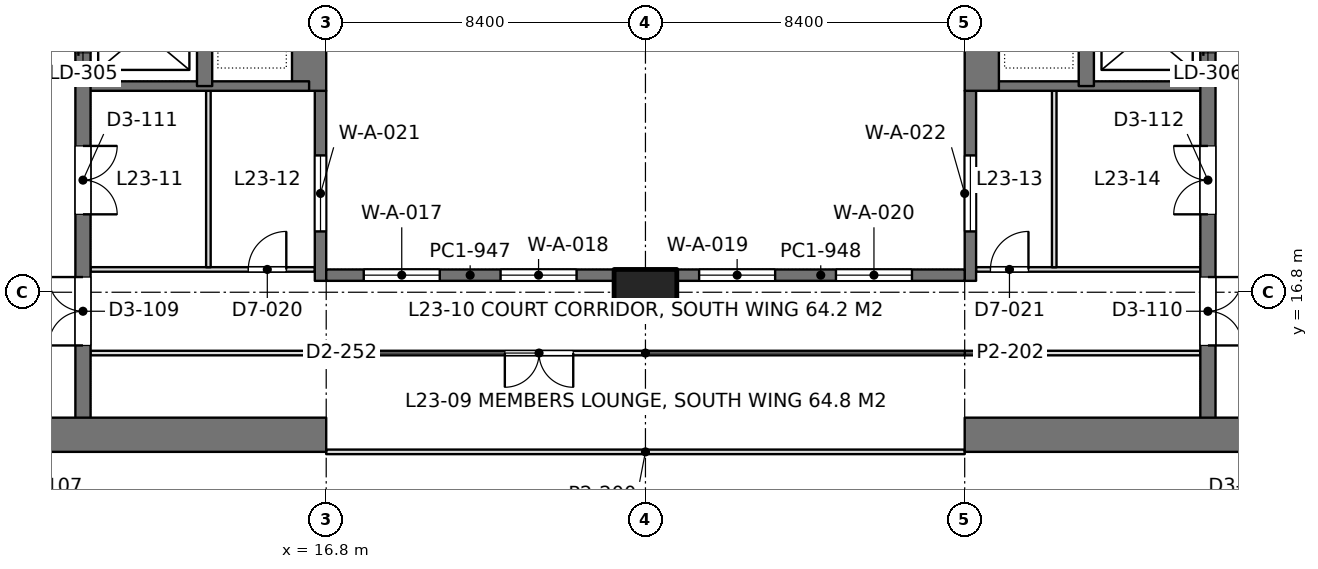
"""IFC4 building model, lengths in metres.
Left out: names, types, materials, properties, quantities, classifications, styles, units other than length and angle.
Written with IfcOpenShell. Run it as: python <this file> out.ifc"""

import sys

from ifc_helpers import new_model, si_unit, direction, frame, frame_2d, origin, origin_2d, place, context, subcontext, project, spatial, rectangle, extrude, element, fill, save


model = new_model("IFC4")
c1 = context("Model", 3, precision=1e-05, world=origin(), true_north=direction((0.0, 1.0)))
c2 = subcontext(c1, "Body", "Model", "MODEL_VIEW")
j1 = project(units=[si_unit("LENGTHUNIT", "METRE"), si_unit("PLANEANGLEUNIT", "RADIAN")], contexts=[c1])
p1 = place(None, origin())
s1 = spatial("IfcSite", under=j1, at=p1, CompositionType="ELEMENT")
p2 = place(p1, origin())
s2 = spatial("IfcBuilding", under=s1, at=p2, CompositionType="ELEMENT")
p3 = place(p2, frame((0.0, 0.0, 105.0)))
s3 = spatial("IfcBuildingStorey", under=s2, at=p3, CompositionType="ELEMENT", Elevation=105.0)
p4 = place(p3, frame((25.2, 16.8, 0.0), z_axis=(0.0, 0.0, 1.0), x_axis=(1.0, 0.0, 0.0)))
e1 = element("IfcColumn", 1, at=p4, inside=s3, PredefinedType="COLUMN", context=c2, shape_type="SweptSolid", body=[
    extrude(rectangle(XDim=1.65, YDim=1.2, at=origin_2d()), origin(), (0.0, 0.0, 1.0), 4.2),
])
p5 = place(p3, frame((-1.2, 13.05, 0.0), z_axis=(0.0, 0.0, 1.0), x_axis=(1.0, 0.0, 0.0)))
e2 = element("IfcWall", 2, at=p5, inside=s3, PredefinedType="SHEAR", context=c2, shape_type="SweptSolid", body=[
    extrude(rectangle(XDim=18.0, YDim=0.9, at=frame_2d((9.0, 0.0))), origin(), (0.0, 0.0, 1.0), 4.2),
])
p6 = place(p5, frame((8.95, 0.0, 0.0)))
e3 = element("IfcOpeningElement", 3, at=p6, cuts=e2, PredefinedType="OPENING", context=c2, shape_type="SweptSolid", body=[
    extrude(rectangle(XDim=1.8, YDim=2.4, at=frame_2d((0.9, 1.2))), frame((0.0, 0.46, 0.0), z_axis=(0.0, -1.0, 0.0), x_axis=(1.0, 0.0, 0.0)), (0.0, 0.0, 1.0), 0.92),
])
p7 = place(p3, frame((16.35, 22.1, 0.0), z_axis=(0.0, 0.0, 1.0), x_axis=(0.0, 1.0, 0.0)))
e4 = element("IfcWall", 4, at=p7, inside=s3, PredefinedType="SHEAR", context=c2, shape_type="SweptSolid", body=[
    extrude(rectangle(XDim=15.25, YDim=0.9, at=frame_2d((7.625, 0.0))), origin(), (0.0, 0.0, 1.0), 4.2),
])
p8 = place(p3, frame((10.4, 13.05, 0.0), z_axis=(0.0, 0.0, 1.0), x_axis=(0.0, 1.0, 0.0)))
e5 = element("IfcWall", 5, at=p8, inside=s3, PredefinedType="SHEAR", context=c2, shape_type="SweptSolid", body=[
    extrude(rectangle(XDim=24.3, YDim=0.4, at=frame_2d((12.15, 0.0))), origin(), (0.0, 0.0, 1.0), 4.2),
])
p9 = place(p8, frame((10.05, 0.0, 0.0)))
e6 = element("IfcOpeningElement", 6, at=p9, cuts=e5, PredefinedType="OPENING", context=c2, shape_type="SweptSolid", body=[
    extrude(rectangle(XDim=1.1, YDim=2.2, at=frame_2d((0.55, 1.1))), frame((0.0, 0.21, 0.0), z_axis=(0.0, -1.0, 0.0), x_axis=(1.0, 0.0, 0.0)), (0.0, 0.0, 1.0), 0.42),
])
p10 = place(p8, frame((12.9, 0.0, 0.0)))
e7 = element("IfcOpeningElement", 7, at=p10, cuts=e5, PredefinedType="OPENING", context=c2, shape_type="SweptSolid", body=[
    extrude(rectangle(XDim=1.1, YDim=2.2, at=frame_2d((0.55, 1.1))), frame((0.0, 0.21, 0.0), z_axis=(0.0, -1.0, 0.0), x_axis=(1.0, 0.0, 0.0)), (0.0, 0.0, 1.0), 0.42),
])
p11 = place(p8, frame((21.45, 0.0, 0.0)))
e8 = element("IfcOpeningElement", 8, at=p11, cuts=e5, PredefinedType="OPENING", context=c2, shape_type="SweptSolid", body=[
    extrude(rectangle(XDim=1.1, YDim=2.2, at=frame_2d((0.55, 1.1))), frame((0.0, 0.21, 0.0), z_axis=(0.0, -1.0, 0.0), x_axis=(1.0, 0.0, 0.0)), (0.0, 0.0, 1.0), 0.42),
])
p12 = place(p8, frame((2.35, 0.0, 0.0)))
e9 = element("IfcOpeningElement", 9, at=p12, cuts=e5, PredefinedType="OPENING", context=c2, shape_type="SweptSolid", body=[
    extrude(rectangle(XDim=1.8, YDim=2.4, at=frame_2d((0.9, 1.2))), frame((0.0, 0.21, 0.0), z_axis=(0.0, -1.0, 0.0), x_axis=(1.0, 0.0, 0.0)), (0.0, 0.0, 1.0), 0.42),
])
p13 = place(p8, frame((5.8, 0.0, 0.0)))
e10 = element("IfcOpeningElement", 10, at=p13, cuts=e5, PredefinedType="OPENING", context=c2, shape_type="SweptSolid", body=[
    extrude(rectangle(XDim=1.8, YDim=2.4, at=frame_2d((0.9, 1.2))), frame((0.0, 0.21, 0.0), z_axis=(0.0, -1.0, 0.0), x_axis=(1.0, 0.0, 0.0)), (0.0, 0.0, 1.0), 0.42),
])
p14 = place(p3, frame((13.6, 22.225, 0.0), z_axis=(0.0, 0.0, 1.0), x_axis=(0.0, 1.0, 0.0)))
e11 = element("IfcWall", 11, at=p14, inside=s3, PredefinedType="SHEAR", context=c2, shape_type="SweptSolid", body=[
    extrude(rectangle(XDim=15.125, YDim=0.4, at=frame_2d((7.562, 0.0))), origin(), (0.0, 0.0, 1.0), 4.2),
])
p15 = place(p3, frame((10.4, 22.225, 0.0), z_axis=(0.0, 0.0, 1.0), x_axis=(1.0, 0.0, 0.0)))
e12 = element("IfcWall", 12, at=p15, inside=s3, PredefinedType="SHEAR", context=c2, shape_type="SweptSolid", body=[
    extrude(rectangle(XDim=5.95, YDim=0.25, at=frame_2d((2.975, 0.0))), origin(), (0.0, 0.0, 1.0), 4.2),
])
p16 = place(p3, frame((33.6, 13.05, 0.0), z_axis=(0.0, 0.0, 1.0), x_axis=(1.0, 0.0, 0.0)))
e13 = element("IfcWall", 13, at=p16, inside=s3, PredefinedType="SHEAR", context=c2, shape_type="SweptSolid", body=[
    extrude(rectangle(XDim=18.0, YDim=0.9, at=frame_2d((9.0, 0.0))), origin(), (0.0, 0.0, 1.0), 4.2),
])
p17 = place(p16, frame((7.25, 0.0, 0.0)))
e14 = element("IfcOpeningElement", 14, at=p17, cuts=e13, PredefinedType="OPENING", context=c2, shape_type="SweptSolid", body=[
    extrude(rectangle(XDim=1.8, YDim=2.4, at=frame_2d((0.9, 1.2))), frame((0.0, 0.46, 0.0), z_axis=(0.0, -1.0, 0.0), x_axis=(1.0, 0.0, 0.0)), (0.0, 0.0, 1.0), 0.92),
])
p18 = place(p3, frame((34.05, 22.1, 0.0), z_axis=(0.0, 0.0, 1.0), x_axis=(0.0, 1.0, 0.0)))
e15 = element("IfcWall", 15, at=p18, inside=s3, PredefinedType="SHEAR", context=c2, shape_type="SweptSolid", body=[
    extrude(rectangle(XDim=15.25, YDim=0.9, at=frame_2d((7.625, 0.0))), origin(), (0.0, 0.0, 1.0), 4.2),
])
p19 = place(p3, frame((40.0, 13.05, 0.0), z_axis=(0.0, 0.0, 1.0), x_axis=(0.0, 1.0, 0.0)))
e16 = element("IfcWall", 16, at=p19, inside=s3, PredefinedType="SHEAR", context=c2, shape_type="SweptSolid", body=[
    extrude(rectangle(XDim=24.3, YDim=0.4, at=frame_2d((12.15, 0.0))), origin(), (0.0, 0.0, 1.0), 4.2),
])
p20 = place(p19, frame((10.05, 0.0, 0.0)))
e17 = element("IfcOpeningElement", 17, at=p20, cuts=e16, PredefinedType="OPENING", context=c2, shape_type="SweptSolid", body=[
    extrude(rectangle(XDim=1.1, YDim=2.2, at=frame_2d((0.55, 1.1))), frame((0.0, 0.21, 0.0), z_axis=(0.0, -1.0, 0.0), x_axis=(1.0, 0.0, 0.0)), (0.0, 0.0, 1.0), 0.42),
])
p21 = place(p19, frame((12.9, 0.0, 0.0)))
e18 = element("IfcOpeningElement", 18, at=p21, cuts=e16, PredefinedType="OPENING", context=c2, shape_type="SweptSolid", body=[
    extrude(rectangle(XDim=1.1, YDim=2.2, at=frame_2d((0.55, 1.1))), frame((0.0, 0.21, 0.0), z_axis=(0.0, -1.0, 0.0), x_axis=(1.0, 0.0, 0.0)), (0.0, 0.0, 1.0), 0.42),
])
p22 = place(p19, frame((21.45, 0.0, 0.0)))
e19 = element("IfcOpeningElement", 19, at=p22, cuts=e16, PredefinedType="OPENING", context=c2, shape_type="SweptSolid", body=[
    extrude(rectangle(XDim=1.1, YDim=2.2, at=frame_2d((0.55, 1.1))), frame((0.0, 0.21, 0.0), z_axis=(0.0, -1.0, 0.0), x_axis=(1.0, 0.0, 0.0)), (0.0, 0.0, 1.0), 0.42),
])
p23 = place(p19, frame((2.35, 0.0, 0.0)))
e20 = element("IfcOpeningElement", 20, at=p23, cuts=e16, PredefinedType="OPENING", context=c2, shape_type="SweptSolid", body=[
    extrude(rectangle(XDim=1.8, YDim=2.4, at=frame_2d((0.9, 1.2))), frame((0.0, 0.21, 0.0), z_axis=(0.0, -1.0, 0.0), x_axis=(1.0, 0.0, 0.0)), (0.0, 0.0, 1.0), 0.42),
])
p24 = place(p19, frame((5.8, 0.0, 0.0)))
e21 = element("IfcOpeningElement", 21, at=p24, cuts=e16, PredefinedType="OPENING", context=c2, shape_type="SweptSolid", body=[
    extrude(rectangle(XDim=1.8, YDim=2.4, at=frame_2d((0.9, 1.2))), frame((0.0, 0.21, 0.0), z_axis=(0.0, -1.0, 0.0), x_axis=(1.0, 0.0, 0.0)), (0.0, 0.0, 1.0), 0.42),
])
p25 = place(p3, frame((36.8, 22.225, 0.0), z_axis=(0.0, 0.0, 1.0), x_axis=(0.0, 1.0, 0.0)))
e22 = element("IfcWall", 22, at=p25, inside=s3, PredefinedType="SHEAR", context=c2, shape_type="SweptSolid", body=[
    extrude(rectangle(XDim=15.125, YDim=0.4, at=frame_2d((7.562, 0.0))), origin(), (0.0, 0.0, 1.0), 4.2),
])
p26 = place(p3, frame((40.0, 22.225, 0.0), z_axis=(0.0, 0.0, 1.0), x_axis=(-1.0, 0.0, 0.0)))
e23 = element("IfcWall", 23, at=p26, inside=s3, PredefinedType="SHEAR", context=c2, shape_type="SweptSolid", body=[
    extrude(rectangle(XDim=5.95, YDim=0.25, at=frame_2d((2.975, 0.0))), origin(), (0.0, 0.0, 1.0), 4.2),
])
p27 = place(p3, frame((16.65, 17.1, 0.0), z_axis=(0.0, 0.0, 1.0), x_axis=(0.0, 1.0, 0.0)))
e24 = element("IfcWall", 24, at=p27, inside=s3, PredefinedType="SOLIDWALL", context=c2, shape_type="SweptSolid", body=[
    extrude(rectangle(XDim=5.0, YDim=0.3, at=frame_2d((2.5, 0.0))), origin(), (0.0, 0.0, 1.0), 4.05),
])
p28 = place(p27, frame((1.3, 0.0, 0.1)))
e25 = element("IfcOpeningElement", 25, at=p28, cuts=e24, PredefinedType="OPENING", context=c2, shape_type="SweptSolid", body=[
    extrude(rectangle(XDim=2.0, YDim=3.0, at=frame_2d((1.0, 1.5))), frame((0.0, 0.16, 0.0), z_axis=(0.0, -1.0, 0.0), x_axis=(1.0, 0.0, 0.0)), (0.0, 0.0, 1.0), 0.32),
])
p29 = place(p3, frame((33.75, 17.1, 0.0), z_axis=(0.0, 0.0, 1.0), x_axis=(0.0, 1.0, 0.0)))
e26 = element("IfcWall", 26, at=p29, inside=s3, PredefinedType="SOLIDWALL", context=c2, shape_type="SweptSolid", body=[
    extrude(rectangle(XDim=5.0, YDim=0.3, at=frame_2d((2.5, 0.0))), origin(), (0.0, 0.0, 1.0), 4.05),
])
p30 = place(p29, frame((1.3, 0.0, 0.1)))
e27 = element("IfcOpeningElement", 27, at=p30, cuts=e26, PredefinedType="OPENING", context=c2, shape_type="SweptSolid", body=[
    extrude(rectangle(XDim=2.0, YDim=3.0, at=frame_2d((1.0, 1.5))), frame((0.0, 0.16, 0.0), z_axis=(0.0, -1.0, 0.0), x_axis=(1.0, 0.0, 0.0)), (0.0, 0.0, 1.0), 0.32),
])
p31 = place(p3, frame((16.8, 17.25, 0.0), z_axis=(0.0, 0.0, 1.0), x_axis=(1.0, 0.0, 0.0)))
e28 = element("IfcWall", 28, at=p31, inside=s3, PredefinedType="SOLIDWALL", context=c2, shape_type="SweptSolid", body=[
    extrude(rectangle(XDim=7.575, YDim=0.3, at=frame_2d((3.788, 0.0))), origin(), (0.0, 0.0, 1.0), 4.05),
])
p32 = place(p31, frame((0.988, 0.0, 0.1)))
e29 = element("IfcOpeningElement", 29, at=p32, cuts=e28, PredefinedType="OPENING", context=c2, shape_type="SweptSolid", body=[
    extrude(rectangle(XDim=2.0, YDim=3.0, at=frame_2d((1.0, 1.5))), frame((0.0, 0.16, 0.0), z_axis=(0.0, -1.0, 0.0), x_axis=(1.0, 0.0, 0.0)), (0.0, 0.0, 1.0), 0.32),
])
p33 = place(p31, frame((4.587, 0.0, 0.1)))
e30 = element("IfcOpeningElement", 30, at=p33, cuts=e28, PredefinedType="OPENING", context=c2, shape_type="SweptSolid", body=[
    extrude(rectangle(XDim=2.0, YDim=3.0, at=frame_2d((1.0, 1.5))), frame((0.0, 0.16, 0.0), z_axis=(0.0, -1.0, 0.0), x_axis=(1.0, 0.0, 0.0)), (0.0, 0.0, 1.0), 0.32),
])
p34 = place(p3, frame((26.025, 17.25, 0.0), z_axis=(0.0, 0.0, 1.0), x_axis=(1.0, 0.0, 0.0)))
e31 = element("IfcWall", 31, at=p34, inside=s3, PredefinedType="SOLIDWALL", context=c2, shape_type="SweptSolid", body=[
    extrude(rectangle(XDim=7.575, YDim=0.3, at=frame_2d((3.788, 0.0))), origin(), (0.0, 0.0, 1.0), 4.05),
])
p35 = place(p34, frame((0.587, 0.0, 0.1)))
e32 = element("IfcOpeningElement", 32, at=p35, cuts=e31, PredefinedType="OPENING", context=c2, shape_type="SweptSolid", body=[
    extrude(rectangle(XDim=2.0, YDim=3.0, at=frame_2d((1.0, 1.5))), frame((0.0, 0.16, 0.0), z_axis=(0.0, -1.0, 0.0), x_axis=(1.0, 0.0, 0.0)), (0.0, 0.0, 1.0), 0.32),
])
p36 = place(p34, frame((4.188, 0.0, 0.1)))
e33 = element("IfcOpeningElement", 33, at=p36, cuts=e31, PredefinedType="OPENING", context=c2, shape_type="SweptSolid", body=[
    extrude(rectangle(XDim=2.0, YDim=3.0, at=frame_2d((1.0, 1.5))), frame((0.0, 0.16, 0.0), z_axis=(0.0, -1.0, 0.0), x_axis=(1.0, 0.0, 0.0)), (0.0, 0.0, 1.0), 0.32),
])
p37 = place(p3, frame((10.598, 17.4, 0.0), z_axis=(0.0, 0.0, 1.0), x_axis=(1.0, 0.0, 0.0)))
e34 = element("IfcWall", 34, at=p37, inside=s3, PredefinedType="PARTITIONING", context=c2, shape_type="SweptSolid", body=[
    extrude(rectangle(XDim=5.904, YDim=0.12, at=frame_2d((2.952, 0.0))), origin(), (0.0, 0.0, 1.0), 3.55),
])
p38 = place(p37, frame((4.152, 0.0, 0.0)))
e35 = element("IfcOpeningElement", 35, at=p38, cuts=e34, PredefinedType="OPENING", context=c2, shape_type="SweptSolid", body=[
    extrude(rectangle(XDim=1.0, YDim=2.4, at=frame_2d((0.5, 1.2))), frame((0.0, 0.07, 0.0), z_axis=(0.0, -1.0, 0.0), x_axis=(1.0, 0.0, 0.0)), (0.0, 0.0, 1.0), 0.14),
])
p39 = place(p3, frame((13.7, 17.458, 0.0), z_axis=(0.0, 0.0, 1.0), x_axis=(0.0, 1.0, 0.0)))
e36 = element("IfcWall", 36, at=p39, inside=s3, PredefinedType="PARTITIONING", context=c2, shape_type="SweptSolid", body=[
    extrude(rectangle(XDim=4.644, YDim=0.12, at=frame_2d((2.322, 0.0))), origin(), (0.0, 0.0, 1.0), 3.6),
])
p40 = place(p3, frame((33.898, 17.4, 0.0), z_axis=(0.0, 0.0, 1.0), x_axis=(1.0, 0.0, 0.0)))
e37 = element("IfcWall", 37, at=p40, inside=s3, PredefinedType="PARTITIONING", context=c2, shape_type="SweptSolid", body=[
    extrude(rectangle(XDim=5.904, YDim=0.12, at=frame_2d((2.952, 0.0))), origin(), (0.0, 0.0, 1.0), 3.55),
])
p41 = place(p40, frame((0.38, 0.0, 0.0)))
e38 = element("IfcOpeningElement", 38, at=p41, cuts=e37, PredefinedType="OPENING", context=c2, shape_type="SweptSolid", body=[
    extrude(rectangle(XDim=1.0, YDim=2.4, at=frame_2d((0.5, 1.2))), frame((0.0, 0.07, 0.0), z_axis=(0.0, -1.0, 0.0), x_axis=(1.0, 0.0, 0.0)), (0.0, 0.0, 1.0), 0.14),
])
p42 = place(p3, frame((35.956, 17.458, 0.0), z_axis=(0.0, 0.0, 1.0), x_axis=(0.0, 1.0, 0.0)))
e39 = element("IfcWall", 39, at=p42, inside=s3, PredefinedType="PARTITIONING", context=c2, shape_type="SweptSolid", body=[
    extrude(rectangle(XDim=4.644, YDim=0.12, at=frame_2d((2.322, 0.0))), origin(), (0.0, 0.0, 1.0), 3.6),
])
for number, where, z_axis, x_axis in (
    (40, (10.598, 15.2, 0.0), (0.0, 0.0, 1.0), (1.0, 0.0, 0.0)),
    (41, (33.598, 15.2, 0.0), (0.0, 0.0, 1.0), (1.0, 0.0, 0.0)),
):
    element("IfcWall", number, at=place(p3, frame(where, z_axis=z_axis, x_axis=x_axis)), inside=s3, PredefinedType="PARTITIONING", context=c2, shape_type="SweptSolid", body=[
        extrude(rectangle(XDim=6.204, YDim=0.12, at=frame_2d((3.102, 0.0))), origin(), (0.0, 0.0, 1.0), 3.55),
    ])
p43 = place(p3, frame((16.798, 15.2, 0.0), z_axis=(0.0, 0.0, 1.0), x_axis=(1.0, 0.0, 0.0)))
e42 = element("IfcWall", 42, at=p43, inside=s3, PredefinedType="PARTITIONING", context=c2, shape_type="SweptSolid", body=[
    extrude(rectangle(XDim=16.804, YDim=0.12, at=frame_2d((8.402, 0.0))), origin(), (0.0, 0.0, 1.0), 3.55),
])
p44 = place(p43, frame((4.702, 0.0, 0.0)))
e43 = element("IfcOpeningElement", 43, at=p44, cuts=e42, PredefinedType="OPENING", context=c2, shape_type="SweptSolid", body=[
    extrude(rectangle(XDim=1.8, YDim=2.2, at=frame_2d((0.9, 1.1))), frame((0.0, 0.07, 0.0), z_axis=(0.0, -1.0, 0.0), x_axis=(1.0, 0.0, 0.0)), (0.0, 0.0, 1.0), 0.14),
])
p45 = place(p3, frame((16.8, 12.6, 0.0), z_axis=(0.0, 0.0, 1.0), x_axis=(1.0, 0.0, 0.0)))
e44 = element("IfcWall", 44, at=p45, inside=s3, PredefinedType="PARTITIONING", context=c2, shape_type="SweptSolid", body=[
    extrude(rectangle(XDim=16.8, YDim=0.12, at=frame_2d((8.4, 0.0))), origin(), (0.0, 0.0, 1.0), 3.55),
])
p46 = place(p28, origin())
e45 = element("IfcWindow", 45, at=p46, inside=s3, PartitioningType="SINGLE_PANEL", PredefinedType="WINDOW", context=c2, shape_type="SweptSolid", body=[
    extrude(rectangle(XDim=2.0, YDim=3.0, at=frame_2d((1.0, 1.5))), frame((0.0, 0.03, 0.0), z_axis=(0.0, -1.0, 0.0), x_axis=(1.0, 0.0, 0.0)), (0.0, 0.0, 1.0), 0.06),
])
fill(e25, e45)
p47 = place(p30, origin())
e46 = element("IfcWindow", 46, at=p47, inside=s3, PartitioningType="SINGLE_PANEL", PredefinedType="WINDOW", context=c2, shape_type="SweptSolid", body=[
    extrude(rectangle(XDim=2.0, YDim=3.0, at=frame_2d((1.0, 1.5))), frame((0.0, 0.03, 0.0), z_axis=(0.0, -1.0, 0.0), x_axis=(1.0, 0.0, 0.0)), (0.0, 0.0, 1.0), 0.06),
])
fill(e27, e46)
p48 = place(p32, origin())
e47 = element("IfcWindow", 47, at=p48, inside=s3, PartitioningType="SINGLE_PANEL", PredefinedType="WINDOW", context=c2, shape_type="SweptSolid", body=[
    extrude(rectangle(XDim=2.0, YDim=3.0, at=frame_2d((1.0, 1.5))), frame((0.0, 0.03, 0.0), z_axis=(0.0, -1.0, 0.0), x_axis=(1.0, 0.0, 0.0)), (0.0, 0.0, 1.0), 0.06),
])
fill(e29, e47)
p49 = place(p33, origin())
e48 = element("IfcWindow", 48, at=p49, inside=s3, PartitioningType="SINGLE_PANEL", PredefinedType="WINDOW", context=c2, shape_type="SweptSolid", body=[
    extrude(rectangle(XDim=2.0, YDim=3.0, at=frame_2d((1.0, 1.5))), frame((0.0, 0.03, 0.0), z_axis=(0.0, -1.0, 0.0), x_axis=(1.0, 0.0, 0.0)), (0.0, 0.0, 1.0), 0.06),
])
fill(e30, e48)
p50 = place(p35, origin())
e49 = element("IfcWindow", 49, at=p50, inside=s3, PartitioningType="SINGLE_PANEL", PredefinedType="WINDOW", context=c2, shape_type="SweptSolid", body=[
    extrude(rectangle(XDim=2.0, YDim=3.0, at=frame_2d((1.0, 1.5))), frame((0.0, 0.03, 0.0), z_axis=(0.0, -1.0, 0.0), x_axis=(1.0, 0.0, 0.0)), (0.0, 0.0, 1.0), 0.06),
])
fill(e32, e49)
p51 = place(p36, origin())
e50 = element("IfcWindow", 50, at=p51, inside=s3, PartitioningType="SINGLE_PANEL", PredefinedType="WINDOW", context=c2, shape_type="SweptSolid", body=[
    extrude(rectangle(XDim=2.0, YDim=3.0, at=frame_2d((1.0, 1.5))), frame((0.0, 0.03, 0.0), z_axis=(0.0, -1.0, 0.0), x_axis=(1.0, 0.0, 0.0)), (0.0, 0.0, 1.0), 0.06),
])
fill(e33, e50)
p52 = place(p12, origin())
e51 = element("IfcDoor", 51, at=p52, inside=s3, OperationType="DOUBLE_DOOR_SINGLE_SWING", PredefinedType="DOOR", context=c2, shape_type="SweptSolid", body=[
    extrude(rectangle(XDim=1.8, YDim=2.4, at=frame_2d((0.9, 1.2))), frame((0.0, 0.025, 0.0), z_axis=(0.0, -1.0, 0.0), x_axis=(1.0, 0.0, 0.0)), (0.0, 0.0, 1.0), 0.05),
])
fill(e9, e51)
p53 = place(p13, frame((1.8, 0.0, 0.0), z_axis=(0.0, 0.0, 1.0), x_axis=(-1.0, 0.0, 0.0)))
e52 = element("IfcDoor", 52, at=p53, inside=s3, OperationType="DOUBLE_DOOR_SINGLE_SWING", PredefinedType="DOOR", context=c2, shape_type="SweptSolid", body=[
    extrude(rectangle(XDim=1.8, YDim=2.4, at=frame_2d((0.9, 1.2))), frame((0.0, 0.025, 0.0), z_axis=(0.0, -1.0, 0.0), x_axis=(1.0, 0.0, 0.0)), (0.0, 0.0, 1.0), 0.05),
])
fill(e10, e52)
p54 = place(p23, frame((1.8, 0.0, 0.0), z_axis=(0.0, 0.0, 1.0), x_axis=(-1.0, 0.0, 0.0)))
e53 = element("IfcDoor", 53, at=p54, inside=s3, OperationType="DOUBLE_DOOR_SINGLE_SWING", PredefinedType="DOOR", context=c2, shape_type="SweptSolid", body=[
    extrude(rectangle(XDim=1.8, YDim=2.4, at=frame_2d((0.9, 1.2))), frame((0.0, 0.025, 0.0), z_axis=(0.0, -1.0, 0.0), x_axis=(1.0, 0.0, 0.0)), (0.0, 0.0, 1.0), 0.05),
])
fill(e20, e53)
p55 = place(p24, origin())
e54 = element("IfcDoor", 54, at=p55, inside=s3, OperationType="DOUBLE_DOOR_SINGLE_SWING", PredefinedType="DOOR", context=c2, shape_type="SweptSolid", body=[
    extrude(rectangle(XDim=1.8, YDim=2.4, at=frame_2d((0.9, 1.2))), frame((0.0, 0.025, 0.0), z_axis=(0.0, -1.0, 0.0), x_axis=(1.0, 0.0, 0.0)), (0.0, 0.0, 1.0), 0.05),
])
fill(e21, e54)
p56 = place(p38, origin())
e55 = element("IfcDoor", 55, at=p56, inside=s3, OperationType="SINGLE_SWING_RIGHT", PredefinedType="DOOR", context=c2, shape_type="SweptSolid", body=[
    extrude(rectangle(XDim=1.0, YDim=2.4, at=frame_2d((0.5, 1.2))), frame((0.0, 0.025, 0.0), z_axis=(0.0, -1.0, 0.0), x_axis=(1.0, 0.0, 0.0)), (0.0, 0.0, 1.0), 0.05),
])
fill(e35, e55)
p57 = place(p41, origin())
e56 = element("IfcDoor", 56, at=p57, inside=s3, OperationType="SINGLE_SWING_RIGHT", PredefinedType="DOOR", context=c2, shape_type="SweptSolid", body=[
    extrude(rectangle(XDim=1.0, YDim=2.4, at=frame_2d((0.5, 1.2))), frame((0.0, 0.025, 0.0), z_axis=(0.0, -1.0, 0.0), x_axis=(1.0, 0.0, 0.0)), (0.0, 0.0, 1.0), 0.05),
])
fill(e38, e56)
p58 = place(p44, frame((1.8, 0.0, 0.0), z_axis=(0.0, 0.0, 1.0), x_axis=(-1.0, 0.0, 0.0)))
e57 = element("IfcDoor", 57, at=p58, inside=s3, OperationType="DOUBLE_DOOR_SINGLE_SWING", PredefinedType="DOOR", context=c2, shape_type="SweptSolid", body=[
    extrude(rectangle(XDim=1.8, YDim=2.2, at=frame_2d((0.9, 1.1))), frame((0.0, 0.025, 0.0), z_axis=(0.0, -1.0, 0.0), x_axis=(1.0, 0.0, 0.0)), (0.0, 0.0, 1.0), 0.05),
])
fill(e43, e57)
save(model, sys.argv[1])
